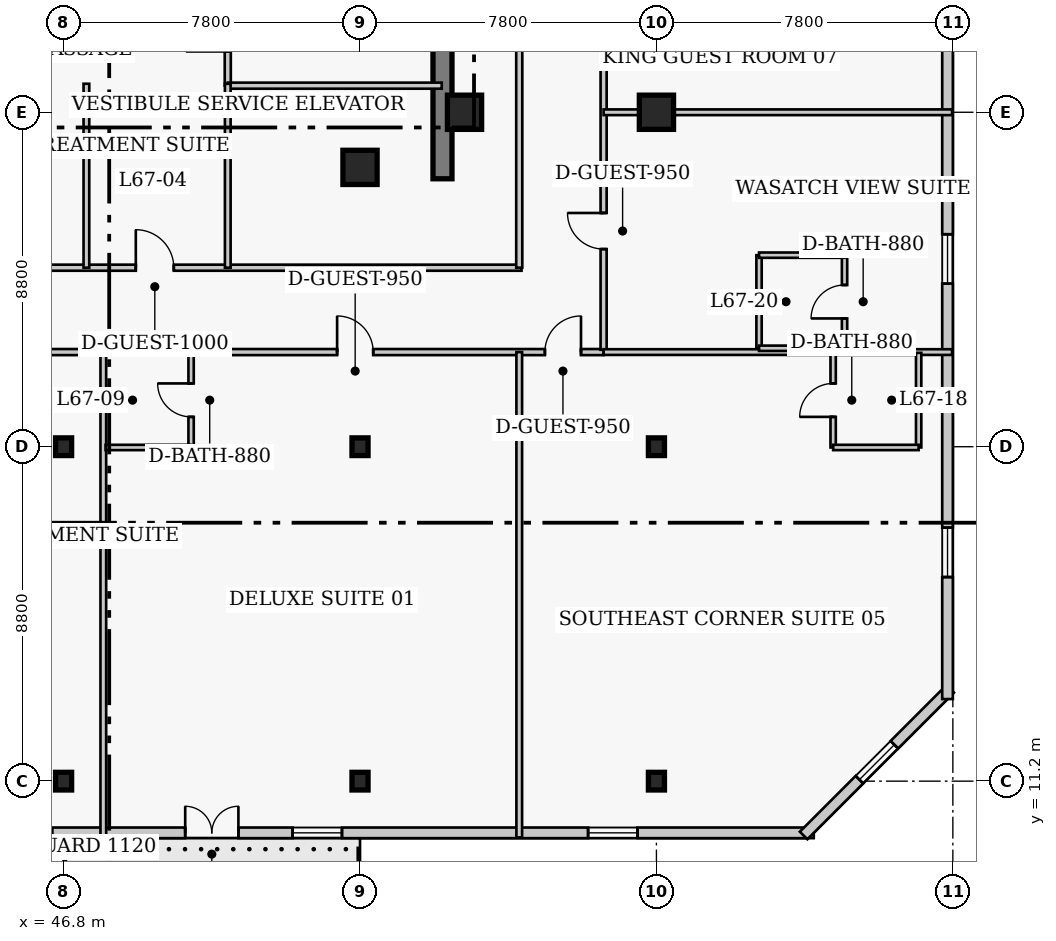
"""IFC4 building model, lengths in metres.
Left out: names, types, materials, properties, quantities, classifications, styles, units other than length and angle.
Written with IfcOpenShell. Run it as: python <this file> out.ifc"""

import sys

from ifc_helpers import new_model, si_unit, direction, frame, frame_2d, origin, origin_2d, place, context, subcontext, project, spatial, rectangle, i_section, extrude, element, fill, save


model = new_model("IFC4")
c1 = context("Model", 3, precision=1e-05, world=origin(), true_north=direction((0.0, 1.0)))
c2 = subcontext(c1, "Body", "Model", "MODEL_VIEW")
j1 = project(units=[si_unit("LENGTHUNIT", "METRE"), si_unit("PLANEANGLEUNIT", "RADIAN")], contexts=[c1])
p1 = place(None, origin())
s1 = spatial("IfcSite", under=j1, at=p1, CompositionType="ELEMENT")
p2 = place(p1, origin())
s2 = spatial("IfcBuilding", under=s1, at=p2, CompositionType="ELEMENT")
p3 = place(p2, frame((0.0, 0.0, 269.4)))
s3 = spatial("IfcBuildingStorey", under=s2, at=p3, CompositionType="ELEMENT", Elevation=269.4)
p4 = place(p3, frame((56.77, 27.05, 0.0), z_axis=(0.0, 0.0, 1.0), x_axis=(0.0, 1.0, 0.0)))
e1 = element("IfcWall", 1, at=p4, inside=s3, PredefinedType="SHEAR", context=c2, shape_type="SweptSolid", body=[
    extrude(rectangle(XDim=13.52, YDim=0.5, at=frame_2d((6.76, 0.0))), origin(), (0.0, 0.0, 1.0), 4.0),
])
for number, where, z_axis, x_axis in (
    (2, (46.8, 11.2, 0.0), (0.0, 0.0, 1.0), (1.0, 0.0, 0.0)),
    (3, (46.8, 20.0, 0.0), (0.0, 0.0, 1.0), (1.0, 0.0, 0.0)),
    (4, (54.6, 11.2, 0.0), (0.0, 0.0, 1.0), (1.0, 0.0, 0.0)),
    (5, (54.6, 20.0, 0.0), (0.0, 0.0, 1.0), (1.0, 0.0, 0.0)),
    (6, (62.4, 11.2, 0.0), (0.0, 0.0, 1.0), (1.0, 0.0, 0.0)),
    (7, (62.4, 20.0, 0.0), (0.0, 0.0, 1.0), (1.0, 0.0, 0.0)),
):
    element("IfcColumn", number, at=place(p3, frame(where, z_axis=z_axis, x_axis=x_axis)), inside=s3, PredefinedType="COLUMN", context=c2, shape_type="SweptSolid", body=[
        extrude(i_section(OverallWidth=0.422, OverallDepth=0.465, WebThickness=0.045, FlangeThickness=0.073, FilletRadius=0.017, at=origin_2d()), origin(), (0.0, 0.0, 1.0), 4.0),
    ])
for number, where, z_axis, x_axis in (
    (8, (62.4, 28.8, 0.0), (0.0, 0.0, 1.0), (1.0, 0.0, 0.0)),
    (9, (57.35, 28.8, 0.0), (0.0, 0.0, 1.0), (1.0, 0.0, 0.0)),
    (10, (54.6, 27.35, 0.0), (0.0, 0.0, 1.0), (1.0, 0.0, 0.0)),
):
    element("IfcColumn", number, at=place(p3, frame(where, z_axis=z_axis, x_axis=x_axis)), inside=s3, PredefinedType="COLUMN", context=c2, shape_type="SweptSolid", body=[
        extrude(rectangle(XDim=0.9, YDim=0.9, at=origin_2d()), origin(), (0.0, 0.0, 1.0), 4.0),
    ])
p5 = place(p3, frame((41.71, 9.84, 0.0), z_axis=(0.0, 0.0, 1.0), x_axis=(1.0, 0.0, 0.0)))
e11 = element("IfcWall", 11, at=p5, inside=s3, PredefinedType="SOLIDWALL", context=c2, shape_type="SweptSolid", body=[
    extrude(rectangle(XDim=24.83, YDim=0.28, at=frame_2d((12.415, 0.0))), origin(), (0.0, 0.0, 1.0), 3.76),
])
p6 = place(p5, frame((8.29, 0.0, 0.0)))
e12 = element("IfcOpeningElement", 12, at=p6, cuts=e11, PredefinedType="OPENING", context=c2, shape_type="SweptSolid", body=[
    extrude(rectangle(XDim=1.4, YDim=2.15, at=frame_2d((0.7, 1.075))), frame((0.0, 0.15, 0.0), z_axis=(0.0, -1.0, 0.0), x_axis=(1.0, 0.0, 0.0)), (0.0, 0.0, 1.0), 0.3),
])
p7 = place(p5, frame((3.488, 0.0, 0.85)))
e13 = element("IfcOpeningElement", 13, at=p7, cuts=e11, PredefinedType="OPENING", context=c2, shape_type="SweptSolid", body=[
    extrude(rectangle(XDim=1.3, YDim=1.7, at=frame_2d((0.65, 0.85))), frame((0.0, 0.15, 0.0), z_axis=(0.0, -1.0, 0.0), x_axis=(1.0, 0.0, 0.0)), (0.0, 0.0, 1.0), 0.3),
])
p8 = place(p5, frame((11.115, 0.0, 0.85)))
e14 = element("IfcOpeningElement", 14, at=p8, cuts=e11, PredefinedType="OPENING", context=c2, shape_type="SweptSolid", body=[
    extrude(rectangle(XDim=1.3, YDim=1.7, at=frame_2d((0.65, 0.85))), frame((0.0, 0.15, 0.0), z_axis=(0.0, -1.0, 0.0), x_axis=(1.0, 0.0, 0.0)), (0.0, 0.0, 1.0), 0.3),
])
p9 = place(p5, frame((18.892, 0.0, 0.85)))
e15 = element("IfcOpeningElement", 15, at=p9, cuts=e11, PredefinedType="OPENING", context=c2, shape_type="SweptSolid", body=[
    extrude(rectangle(XDim=1.3, YDim=1.7, at=frame_2d((0.65, 0.85))), frame((0.0, 0.15, 0.0), z_axis=(0.0, -1.0, 0.0), x_axis=(1.0, 0.0, 0.0)), (0.0, 0.0, 1.0), 0.3),
])
p10 = place(p3, frame((66.273, 9.771, 0.0), z_axis=(0.0, 0.0, 1.0), x_axis=(0.707129162587, 0.707084399077, 0.0)))
e16 = element("IfcWall", 16, at=p10, inside=s3, PredefinedType="SOLIDWALL", context=c2, shape_type="SweptSolid", body=[
    extrude(rectangle(XDim=5.454, YDim=0.28, at=frame_2d((2.727, 0.0))), origin(), (0.0, 0.0, 1.0), 3.76),
])
p11 = place(p10, frame((2.077, 0.0, 0.85)))
e17 = element("IfcOpeningElement", 17, at=p11, cuts=e16, PredefinedType="OPENING", context=c2, shape_type="SweptSolid", body=[
    extrude(rectangle(XDim=1.3, YDim=1.7, at=frame_2d((0.65, 0.85))), frame((0.0, 0.15, 0.0), z_axis=(0.0, -1.0, 0.0), x_axis=(1.0, 0.0, 0.0)), (0.0, 0.0, 1.0), 0.3),
])
p12 = place(p3, frame((70.06, 13.36, 0.0), z_axis=(0.0, 0.0, 1.0), x_axis=(0.0, 1.0, 0.0)))
e18 = element("IfcWall", 18, at=p12, inside=s3, PredefinedType="SOLIDWALL", context=c2, shape_type="SweptSolid", body=[
    extrude(rectangle(XDim=30.88, YDim=0.28, at=frame_2d((15.44, 0.0))), origin(), (0.0, 0.0, 1.0), 3.76),
])
p13 = place(p12, frame((3.21, 0.0, 0.85)))
e19 = element("IfcOpeningElement", 19, at=p13, cuts=e18, PredefinedType="OPENING", context=c2, shape_type="SweptSolid", body=[
    extrude(rectangle(XDim=1.3, YDim=1.7, at=frame_2d((0.65, 0.85))), frame((0.0, 0.15, 0.0), z_axis=(0.0, -1.0, 0.0), x_axis=(1.0, 0.0, 0.0)), (0.0, 0.0, 1.0), 0.3),
])
p14 = place(p12, frame((10.93, 0.0, 0.85)))
e20 = element("IfcOpeningElement", 20, at=p14, cuts=e18, PredefinedType="OPENING", context=c2, shape_type="SweptSolid", body=[
    extrude(rectangle(XDim=1.3, YDim=1.7, at=frame_2d((0.65, 0.85))), frame((0.0, 0.15, 0.0), z_axis=(0.0, -1.0, 0.0), x_axis=(1.0, 0.0, 0.0)), (0.0, 0.0, 1.0), 0.3),
])
p15 = place(p12, frame((18.65, 0.0, 0.85)))
e21 = element("IfcOpeningElement", 21, at=p15, cuts=e18, PredefinedType="OPENING", context=c2, shape_type="SweptSolid", body=[
    extrude(rectangle(XDim=1.3, YDim=1.7, at=frame_2d((0.65, 0.85))), frame((0.0, 0.15, 0.0), z_axis=(0.0, -1.0, 0.0), x_axis=(1.0, 0.0, 0.0)), (0.0, 0.0, 1.0), 0.3),
])
p16 = place(p12, frame((26.37, 0.0, 0.85)))
e22 = element("IfcOpeningElement", 22, at=p16, cuts=e18, PredefinedType="OPENING", context=c2, shape_type="SweptSolid", body=[
    extrude(rectangle(XDim=1.3, YDim=1.7, at=frame_2d((0.65, 0.85))), frame((0.0, 0.15, 0.0), z_axis=(0.0, -1.0, 0.0), x_axis=(1.0, 0.0, 0.0)), (0.0, 0.0, 1.0), 0.3),
])
p17 = place(p3, frame((51.12, 29.5, 0.0), z_axis=(0.0, 0.0, 1.0), x_axis=(0.0, 1.0, 0.0)))
e23 = element("IfcWall", 23, at=p17, inside=s3, PredefinedType="PARTITIONING", context=c2, shape_type="SweptSolid", body=[
    extrude(rectangle(XDim=3.7, YDim=0.16, at=frame_2d((1.85, 0.0))), origin(), (0.0, 0.0, 1.0), 3.76),
])
p18 = place(p17, frame((0.9, 0.0, 0.0)))
e24 = element("IfcOpeningElement", 24, at=p18, cuts=e23, PredefinedType="OPENING", context=c2, shape_type="SweptSolid", body=[
    extrude(rectangle(XDim=1.1, YDim=2.15, at=frame_2d((0.55, 1.075))), frame((0.0, 0.09, 0.0), z_axis=(0.0, -1.0, 0.0), x_axis=(1.0, 0.0, 0.0)), (0.0, 0.0, 1.0), 0.18),
])
p19 = place(p3, frame((51.12, 29.5, 0.0), z_axis=(0.0, 0.0, 1.0), x_axis=(1.0, 0.0, 0.0)))
e25 = element("IfcWall", 25, at=p19, inside=s3, PredefinedType="PARTITIONING", context=c2, shape_type="SweptSolid", body=[
    extrude(rectangle(XDim=5.63, YDim=0.16, at=frame_2d((2.815, 0.0))), origin(), (0.0, 0.0, 1.0), 3.76),
])
p20 = place(p3, frame((35.85, 24.71, 0.0), z_axis=(0.0, 0.0, 1.0), x_axis=(1.0, 0.0, 0.0)))
e26 = element("IfcWall", 26, at=p20, inside=s3, PredefinedType="PARTITIONING", context=c2, shape_type="SweptSolid", body=[
    extrude(rectangle(XDim=23.0, YDim=0.16, at=frame_2d((11.5, 0.0))), origin(), (0.0, 0.0, 1.0), 3.76),
])
p21 = place(p20, frame((5.35, 0.0, 0.0)))
e27 = element("IfcOpeningElement", 27, at=p21, cuts=e26, PredefinedType="OPENING", context=c2, shape_type="SweptSolid", body=[
    extrude(rectangle(XDim=1.0, YDim=2.15, at=frame_2d((0.5, 1.075))), frame((0.0, 0.09, 0.0), z_axis=(0.0, -1.0, 0.0), x_axis=(1.0, 0.0, 0.0)), (0.0, 0.0, 1.0), 0.18),
])
p22 = place(p20, frame((12.85, 0.0, 0.0)))
e28 = element("IfcOpeningElement", 28, at=p22, cuts=e26, PredefinedType="OPENING", context=c2, shape_type="SweptSolid", body=[
    extrude(rectangle(XDim=1.0, YDim=2.15, at=frame_2d((0.5, 1.075))), frame((0.0, 0.09, 0.0), z_axis=(0.0, -1.0, 0.0), x_axis=(1.0, 0.0, 0.0)), (0.0, 0.0, 1.0), 0.18),
])
p23 = place(p3, frame((35.8, 22.49, 0.0), z_axis=(0.0, 0.0, 1.0), x_axis=(1.0, 0.0, 0.0)))
e29 = element("IfcWall", 29, at=p23, inside=s3, PredefinedType="PARTITIONING", context=c2, shape_type="SweptSolid", body=[
    extrude(rectangle(XDim=25.21, YDim=0.16, at=frame_2d((12.605, 0.0))), origin(), (0.0, 0.0, 1.0), 3.76),
])
p24 = place(p23, frame((5.522, 0.0, 0.0)))
e30 = element("IfcOpeningElement", 30, at=p24, cuts=e29, PredefinedType="OPENING", context=c2, shape_type="SweptSolid", body=[
    extrude(rectangle(XDim=1.0, YDim=2.15, at=frame_2d((0.5, 1.075))), frame((0.0, 0.09, 0.0), z_axis=(0.0, -1.0, 0.0), x_axis=(1.0, 0.0, 0.0)), (0.0, 0.0, 1.0), 0.18),
])
p25 = place(p23, frame((18.198, 0.0, 0.0)))
e31 = element("IfcOpeningElement", 31, at=p25, cuts=e29, PredefinedType="OPENING", context=c2, shape_type="SweptSolid", body=[
    extrude(rectangle(XDim=0.95, YDim=2.1, at=frame_2d((0.475, 1.05))), frame((0.0, 0.09, 0.0), z_axis=(0.0, -1.0, 0.0), x_axis=(1.0, 0.0, 0.0)), (0.0, 0.0, 1.0), 0.18),
])
p26 = place(p23, frame((23.665, 0.0, 0.0)))
e32 = element("IfcOpeningElement", 32, at=p26, cuts=e29, PredefinedType="OPENING", context=c2, shape_type="SweptSolid", body=[
    extrude(rectangle(XDim=0.95, YDim=2.1, at=frame_2d((0.475, 1.05))), frame((0.0, 0.09, 0.0), z_axis=(0.0, -1.0, 0.0), x_axis=(1.0, 0.0, 0.0)), (0.0, 0.0, 1.0), 0.18),
])
p27 = place(p3, frame((61.01, 22.55, 0.0), z_axis=(0.0, 0.0, 1.0), x_axis=(0.0, 1.0, 0.0)))
e33 = element("IfcWall", 33, at=p27, inside=s3, PredefinedType="PARTITIONING", context=c2, shape_type="SweptSolid", body=[
    extrude(rectangle(XDim=18.1, YDim=0.16, at=frame_2d((9.05, 0.0))), origin(), (0.0, 0.0, 1.0), 3.76),
])
p28 = place(p27, frame((2.65, 0.0, 0.0)))
e34 = element("IfcOpeningElement", 34, at=p28, cuts=e33, PredefinedType="OPENING", context=c2, shape_type="SweptSolid", body=[
    extrude(rectangle(XDim=0.95, YDim=2.1, at=frame_2d((0.475, 1.05))), frame((0.0, 0.09, 0.0), z_axis=(0.0, -1.0, 0.0), x_axis=(1.0, 0.0, 0.0)), (0.0, 0.0, 1.0), 0.18),
])
p29 = place(p27, frame((9.175, 0.0, 0.0)))
e35 = element("IfcOpeningElement", 35, at=p29, cuts=e33, PredefinedType="OPENING", context=c2, shape_type="SweptSolid", body=[
    extrude(rectangle(XDim=0.95, YDim=2.1, at=frame_2d((0.475, 1.05))), frame((0.0, 0.09, 0.0), z_axis=(0.0, -1.0, 0.0), x_axis=(1.0, 0.0, 0.0)), (0.0, 0.0, 1.0), 0.18),
])
p30 = place(p27, frame((13.6, 0.0, 0.0)))
e36 = element("IfcOpeningElement", 36, at=p30, cuts=e33, PredefinedType="OPENING", context=c2, shape_type="SweptSolid", body=[
    extrude(rectangle(XDim=1.0, YDim=2.15, at=frame_2d((0.5, 1.075))), frame((0.0, 0.09, 0.0), z_axis=(0.0, -1.0, 0.0), x_axis=(1.0, 0.0, 0.0)), (0.0, 0.0, 1.0), 0.18),
])
p31 = place(p3, frame((58.79, 24.71, 0.0), z_axis=(0.0, 0.0, 1.0), x_axis=(0.0, 1.0, 0.0)))
e37 = element("IfcWall", 37, at=p31, inside=s3, PredefinedType="PARTITIONING", context=c2, shape_type="SweptSolid", body=[
    extrude(rectangle(XDim=15.94, YDim=0.16, at=frame_2d((7.97, 0.0))), origin(), (0.0, 0.0, 1.0), 3.76),
])
for number, where, z_axis, x_axis in (
    (38, (47.4, 24.71, 0.0), (0.0, 0.0, 1.0), (0.0, 1.0, 0.0)),
    (39, (51.12, 24.71, 0.0), (0.0, 0.0, 1.0), (0.0, 1.0, 0.0)),
):
    element("IfcWall", number, at=place(p3, frame(where, z_axis=z_axis, x_axis=x_axis)), inside=s3, PredefinedType="PARTITIONING", context=c2, shape_type="SweptSolid", body=[
        extrude(rectangle(XDim=4.84, YDim=0.15, at=frame_2d((2.42, 0.0))), origin(), (0.0, 0.0, 1.0), 3.76),
    ])
p32 = place(p3, frame((47.845, 9.72, 0.0), z_axis=(0.0, 0.0, 1.0), x_axis=(0.0, 1.0, 0.0)))
e40 = element("IfcWall", 40, at=p32, inside=s3, PredefinedType="PARTITIONING", context=c2, shape_type="SweptSolid", body=[
    extrude(rectangle(XDim=12.77, YDim=0.15, at=frame_2d((6.385, 0.0))), origin(), (0.0, 0.0, 1.0), 3.76),
])
p33 = place(p3, frame((50.155, 19.98, 0.0), z_axis=(0.0, 0.0, 1.0), x_axis=(0.0, 1.0, 0.0)))
e41 = element("IfcWall", 41, at=p33, inside=s3, PredefinedType="PLUMBINGWALL", context=c2, shape_type="SweptSolid", body=[
    extrude(rectangle(XDim=2.49, YDim=0.14, at=frame_2d((1.245, 0.0))), origin(), (0.0, 0.0, 1.0), 3.76),
])
p34 = place(p33, frame((0.805, 0.0, 0.0)))
e42 = element("IfcOpeningElement", 42, at=p34, cuts=e41, PredefinedType="OPENING", context=c2, shape_type="SweptSolid", body=[
    extrude(rectangle(XDim=0.88, YDim=2.05, at=frame_2d((0.44, 1.025))), frame((0.0, 0.08, 0.0), z_axis=(0.0, -1.0, 0.0), x_axis=(1.0, 0.0, 0.0)), (0.0, 0.0, 1.0), 0.16),
])
p35 = place(p3, frame((47.905, 19.98, 0.0), z_axis=(0.0, 0.0, 1.0), x_axis=(1.0, 0.0, 0.0)))
e43 = element("IfcWall", 43, at=p35, inside=s3, PredefinedType="PLUMBINGWALL", context=c2, shape_type="SweptSolid", body=[
    extrude(rectangle(XDim=2.25, YDim=0.14, at=frame_2d((1.125, 0.0))), origin(), (0.0, 0.0, 1.0), 3.064),
])
p36 = place(p3, frame((58.79, 9.72, 0.0), z_axis=(0.0, 0.0, 1.0), x_axis=(0.0, 1.0, 0.0)))
e44 = element("IfcWall", 44, at=p36, inside=s3, PredefinedType="PARTITIONING", context=c2, shape_type="SweptSolid", body=[
    extrude(rectangle(XDim=12.77, YDim=0.15, at=frame_2d((6.385, 0.0))), origin(), (0.0, 0.0, 1.0), 3.76),
])
p37 = place(p3, frame((61.01, 22.49, 0.0), z_axis=(0.0, 0.0, 1.0), x_axis=(1.0, 0.0, 0.0)))
e45 = element("IfcWall", 45, at=p37, inside=s3, PredefinedType="PARTITIONING", context=c2, shape_type="SweptSolid", body=[
    extrude(rectangle(XDim=9.17, YDim=0.15, at=frame_2d((4.585, 0.0))), origin(), (0.0, 0.0, 1.0), 3.76),
])
p38 = place(p3, frame((67.05, 19.98, 0.0), z_axis=(0.0, 0.0, 1.0), x_axis=(0.0, 1.0, 0.0)))
e46 = element("IfcWall", 46, at=p38, inside=s3, PredefinedType="PLUMBINGWALL", context=c2, shape_type="SweptSolid", body=[
    extrude(rectangle(XDim=2.49, YDim=0.14, at=frame_2d((1.245, 0.0))), origin(), (0.0, 0.0, 1.0), 3.76),
])
p39 = place(p38, frame((0.805, 0.0, 0.0)))
e47 = element("IfcOpeningElement", 47, at=p39, cuts=e46, PredefinedType="OPENING", context=c2, shape_type="SweptSolid", body=[
    extrude(rectangle(XDim=0.88, YDim=2.05, at=frame_2d((0.44, 1.025))), frame((0.0, 0.08, 0.0), z_axis=(0.0, -1.0, 0.0), x_axis=(1.0, 0.0, 0.0)), (0.0, 0.0, 1.0), 0.16),
])
p40 = place(p3, frame((69.3, 19.98, 0.0), z_axis=(0.0, 0.0, 1.0), x_axis=(0.0, 1.0, 0.0)))
e48 = element("IfcWall", 48, at=p40, inside=s3, PredefinedType="PLUMBINGWALL", context=c2, shape_type="SweptSolid", body=[
    extrude(rectangle(XDim=2.49, YDim=0.14, at=frame_2d((1.245, 0.0))), origin(), (0.0, 0.0, 1.0), 3.76),
])
p41 = place(p3, frame((67.05, 19.98, 0.0), z_axis=(0.0, 0.0, 1.0), x_axis=(1.0, 0.0, 0.0)))
e49 = element("IfcWall", 49, at=p41, inside=s3, PredefinedType="PLUMBINGWALL", context=c2, shape_type="SweptSolid", body=[
    extrude(rectangle(XDim=2.25, YDim=0.14, at=frame_2d((1.125, 0.0))), origin(), (0.0, 0.0, 1.0), 3.76),
])
p42 = place(p3, frame((65.1, 22.59, 0.0), z_axis=(0.0, 0.0, 1.0), x_axis=(0.0, 1.0, 0.0)))
e50 = element("IfcWall", 50, at=p42, inside=s3, PredefinedType="PLUMBINGWALL", context=c2, shape_type="SweptSolid", body=[
    extrude(rectangle(XDim=2.45, YDim=0.14, at=frame_2d((1.225, 0.0))), origin(), (0.0, 0.0, 1.0), 3.76),
])
p43 = place(p3, frame((67.35, 22.59, 0.0), z_axis=(0.0, 0.0, 1.0), x_axis=(0.0, 1.0, 0.0)))
e51 = element("IfcWall", 51, at=p43, inside=s3, PredefinedType="PLUMBINGWALL", context=c2, shape_type="SweptSolid", body=[
    extrude(rectangle(XDim=2.45, YDim=0.14, at=frame_2d((1.225, 0.0))), origin(), (0.0, 0.0, 1.0), 3.76),
])
p44 = place(p43, frame((0.785, 0.0, 0.0)))
e52 = element("IfcOpeningElement", 52, at=p44, cuts=e51, PredefinedType="OPENING", context=c2, shape_type="SweptSolid", body=[
    extrude(rectangle(XDim=0.88, YDim=2.05, at=frame_2d((0.44, 1.025))), frame((0.0, 0.08, 0.0), z_axis=(0.0, -1.0, 0.0), x_axis=(1.0, 0.0, 0.0)), (0.0, 0.0, 1.0), 0.16),
])
for number, where, z_axis, x_axis in (
    (53, (65.1, 22.59, 0.0), (0.0, 0.0, 1.0), (1.0, 0.0, 0.0)),
    (54, (65.1, 25.04, 0.0), (0.0, 0.0, 1.0), (1.0, 0.0, 0.0)),
):
    element("IfcWall", number, at=place(p3, frame(where, z_axis=z_axis, x_axis=x_axis)), inside=s3, PredefinedType="PLUMBINGWALL", context=c2, shape_type="SweptSolid", body=[
        extrude(rectangle(XDim=2.25, YDim=0.14, at=frame_2d((1.125, 0.0))), origin(), (0.0, 0.0, 1.0), 3.76),
    ])
p45 = place(p3, frame((61.01, 28.8, 0.0), z_axis=(0.0, 0.0, 1.0), x_axis=(1.0, 0.0, 0.0)))
e55 = element("IfcWall", 55, at=p45, inside=s3, PredefinedType="PARTITIONING", context=c2, shape_type="SweptSolid", body=[
    extrude(rectangle(XDim=9.17, YDim=0.15, at=frame_2d((4.585, 0.0))), origin(), (0.0, 0.0, 1.0), 3.064),
])
p46 = place(p6, origin())
e56 = element("IfcDoor", 56, at=p46, inside=s3, OperationType="DOUBLE_DOOR_SINGLE_SWING", PredefinedType="DOOR", context=c2, shape_type="SweptSolid", body=[
    extrude(rectangle(XDim=1.4, YDim=2.15, at=frame_2d((0.7, 1.075))), frame((0.0, 0.025, 0.0), z_axis=(0.0, -1.0, 0.0), x_axis=(1.0, 0.0, 0.0)), (0.0, 0.0, 1.0), 0.05),
])
fill(e12, e56)
p47 = place(p8, origin())
e57 = element("IfcWindow", 57, at=p47, inside=s3, PartitioningType="SINGLE_PANEL", PredefinedType="WINDOW", context=c2, shape_type="SweptSolid", body=[
    extrude(rectangle(XDim=1.3, YDim=1.7, at=frame_2d((0.65, 0.85))), frame((0.0, 0.03, 0.0), z_axis=(0.0, -1.0, 0.0), x_axis=(1.0, 0.0, 0.0)), (0.0, 0.0, 1.0), 0.06),
])
fill(e14, e57)
p48 = place(p9, origin())
e58 = element("IfcWindow", 58, at=p48, inside=s3, PartitioningType="SINGLE_PANEL", PredefinedType="WINDOW", context=c2, shape_type="SweptSolid", body=[
    extrude(rectangle(XDim=1.3, YDim=1.7, at=frame_2d((0.65, 0.85))), frame((0.0, 0.03, 0.0), z_axis=(0.0, -1.0, 0.0), x_axis=(1.0, 0.0, 0.0)), (0.0, 0.0, 1.0), 0.06),
])
fill(e15, e58)
p49 = place(p11, origin())
e59 = element("IfcWindow", 59, at=p49, inside=s3, PartitioningType="SINGLE_PANEL", PredefinedType="WINDOW", context=c2, shape_type="SweptSolid", body=[
    extrude(rectangle(XDim=1.3, YDim=1.7, at=frame_2d((0.65, 0.85))), frame((0.0, 0.03, 0.0), z_axis=(0.0, -1.0, 0.0), x_axis=(1.0, 0.0, 0.0)), (0.0, 0.0, 1.0), 0.06),
])
fill(e17, e59)
p50 = place(p13, origin())
e60 = element("IfcWindow", 60, at=p50, inside=s3, PartitioningType="SINGLE_PANEL", PredefinedType="WINDOW", context=c2, shape_type="SweptSolid", body=[
    extrude(rectangle(XDim=1.3, YDim=1.7, at=frame_2d((0.65, 0.85))), frame((0.0, 0.03, 0.0), z_axis=(0.0, -1.0, 0.0), x_axis=(1.0, 0.0, 0.0)), (0.0, 0.0, 1.0), 0.06),
])
fill(e19, e60)
p51 = place(p14, origin())
e61 = element("IfcWindow", 61, at=p51, inside=s3, PartitioningType="SINGLE_PANEL", PredefinedType="WINDOW", context=c2, shape_type="SweptSolid", body=[
    extrude(rectangle(XDim=1.3, YDim=1.7, at=frame_2d((0.65, 0.85))), frame((0.0, 0.03, 0.0), z_axis=(0.0, -1.0, 0.0), x_axis=(1.0, 0.0, 0.0)), (0.0, 0.0, 1.0), 0.06),
])
fill(e20, e61)
p52 = place(p22, origin())
e62 = element("IfcDoor", 62, at=p52, inside=s3, OperationType="SINGLE_SWING_LEFT", PredefinedType="DOOR", context=c2, shape_type="SweptSolid", body=[
    extrude(rectangle(XDim=1.0, YDim=2.15, at=frame_2d((0.5, 1.075))), frame((0.0, 0.025, 0.0), z_axis=(0.0, -1.0, 0.0), x_axis=(1.0, 0.0, 0.0)), (0.0, 0.0, 1.0), 0.05),
])
fill(e28, e62)
p53 = place(p34, origin())
e63 = element("IfcDoor", 63, at=p53, inside=s3, OperationType="SINGLE_SWING_RIGHT", PredefinedType="DOOR", context=c2, shape_type="SweptSolid", body=[
    extrude(rectangle(XDim=0.88, YDim=2.05, at=frame_2d((0.44, 1.025))), frame((0.0, 0.025, 0.0), z_axis=(0.0, -1.0, 0.0), x_axis=(1.0, 0.0, 0.0)), (0.0, 0.0, 1.0), 0.05),
])
fill(e42, e63)
p54 = place(p25, origin())
e64 = element("IfcDoor", 64, at=p54, inside=s3, OperationType="SINGLE_SWING_LEFT", PredefinedType="DOOR", context=c2, shape_type="SweptSolid", body=[
    extrude(rectangle(XDim=0.95, YDim=2.1, at=frame_2d((0.475, 1.05))), frame((0.0, 0.025, 0.0), z_axis=(0.0, -1.0, 0.0), x_axis=(1.0, 0.0, 0.0)), (0.0, 0.0, 1.0), 0.05),
])
fill(e31, e64)
p55 = place(p39, origin())
e65 = element("IfcDoor", 65, at=p55, inside=s3, OperationType="SINGLE_SWING_LEFT", PredefinedType="DOOR", context=c2, shape_type="SweptSolid", body=[
    extrude(rectangle(XDim=0.88, YDim=2.05, at=frame_2d((0.44, 1.025))), frame((0.0, 0.025, 0.0), z_axis=(0.0, -1.0, 0.0), x_axis=(1.0, 0.0, 0.0)), (0.0, 0.0, 1.0), 0.05),
])
fill(e47, e65)
p56 = place(p26, origin())
e66 = element("IfcDoor", 66, at=p56, inside=s3, OperationType="SINGLE_SWING_RIGHT", PredefinedType="DOOR", context=c2, shape_type="SweptSolid", body=[
    extrude(rectangle(XDim=0.95, YDim=2.1, at=frame_2d((0.475, 1.05))), frame((0.0, 0.025, 0.0), z_axis=(0.0, -1.0, 0.0), x_axis=(1.0, 0.0, 0.0)), (0.0, 0.0, 1.0), 0.05),
])
fill(e32, e66)
p57 = place(p44, origin())
e67 = element("IfcDoor", 67, at=p57, inside=s3, OperationType="SINGLE_SWING_LEFT", PredefinedType="DOOR", context=c2, shape_type="SweptSolid", body=[
    extrude(rectangle(XDim=0.88, YDim=2.05, at=frame_2d((0.44, 1.025))), frame((0.0, 0.025, 0.0), z_axis=(0.0, -1.0, 0.0), x_axis=(1.0, 0.0, 0.0)), (0.0, 0.0, 1.0), 0.05),
])
fill(e52, e67)
p58 = place(p28, origin())
e68 = element("IfcDoor", 68, at=p58, inside=s3, OperationType="SINGLE_SWING_RIGHT", PredefinedType="DOOR", context=c2, shape_type="SweptSolid", body=[
    extrude(rectangle(XDim=0.95, YDim=2.1, at=frame_2d((0.475, 1.05))), frame((0.0, 0.025, 0.0), z_axis=(0.0, -1.0, 0.0), x_axis=(1.0, 0.0, 0.0)), (0.0, 0.0, 1.0), 0.05),
])
fill(e34, e68)
save(model, sys.argv[1])
